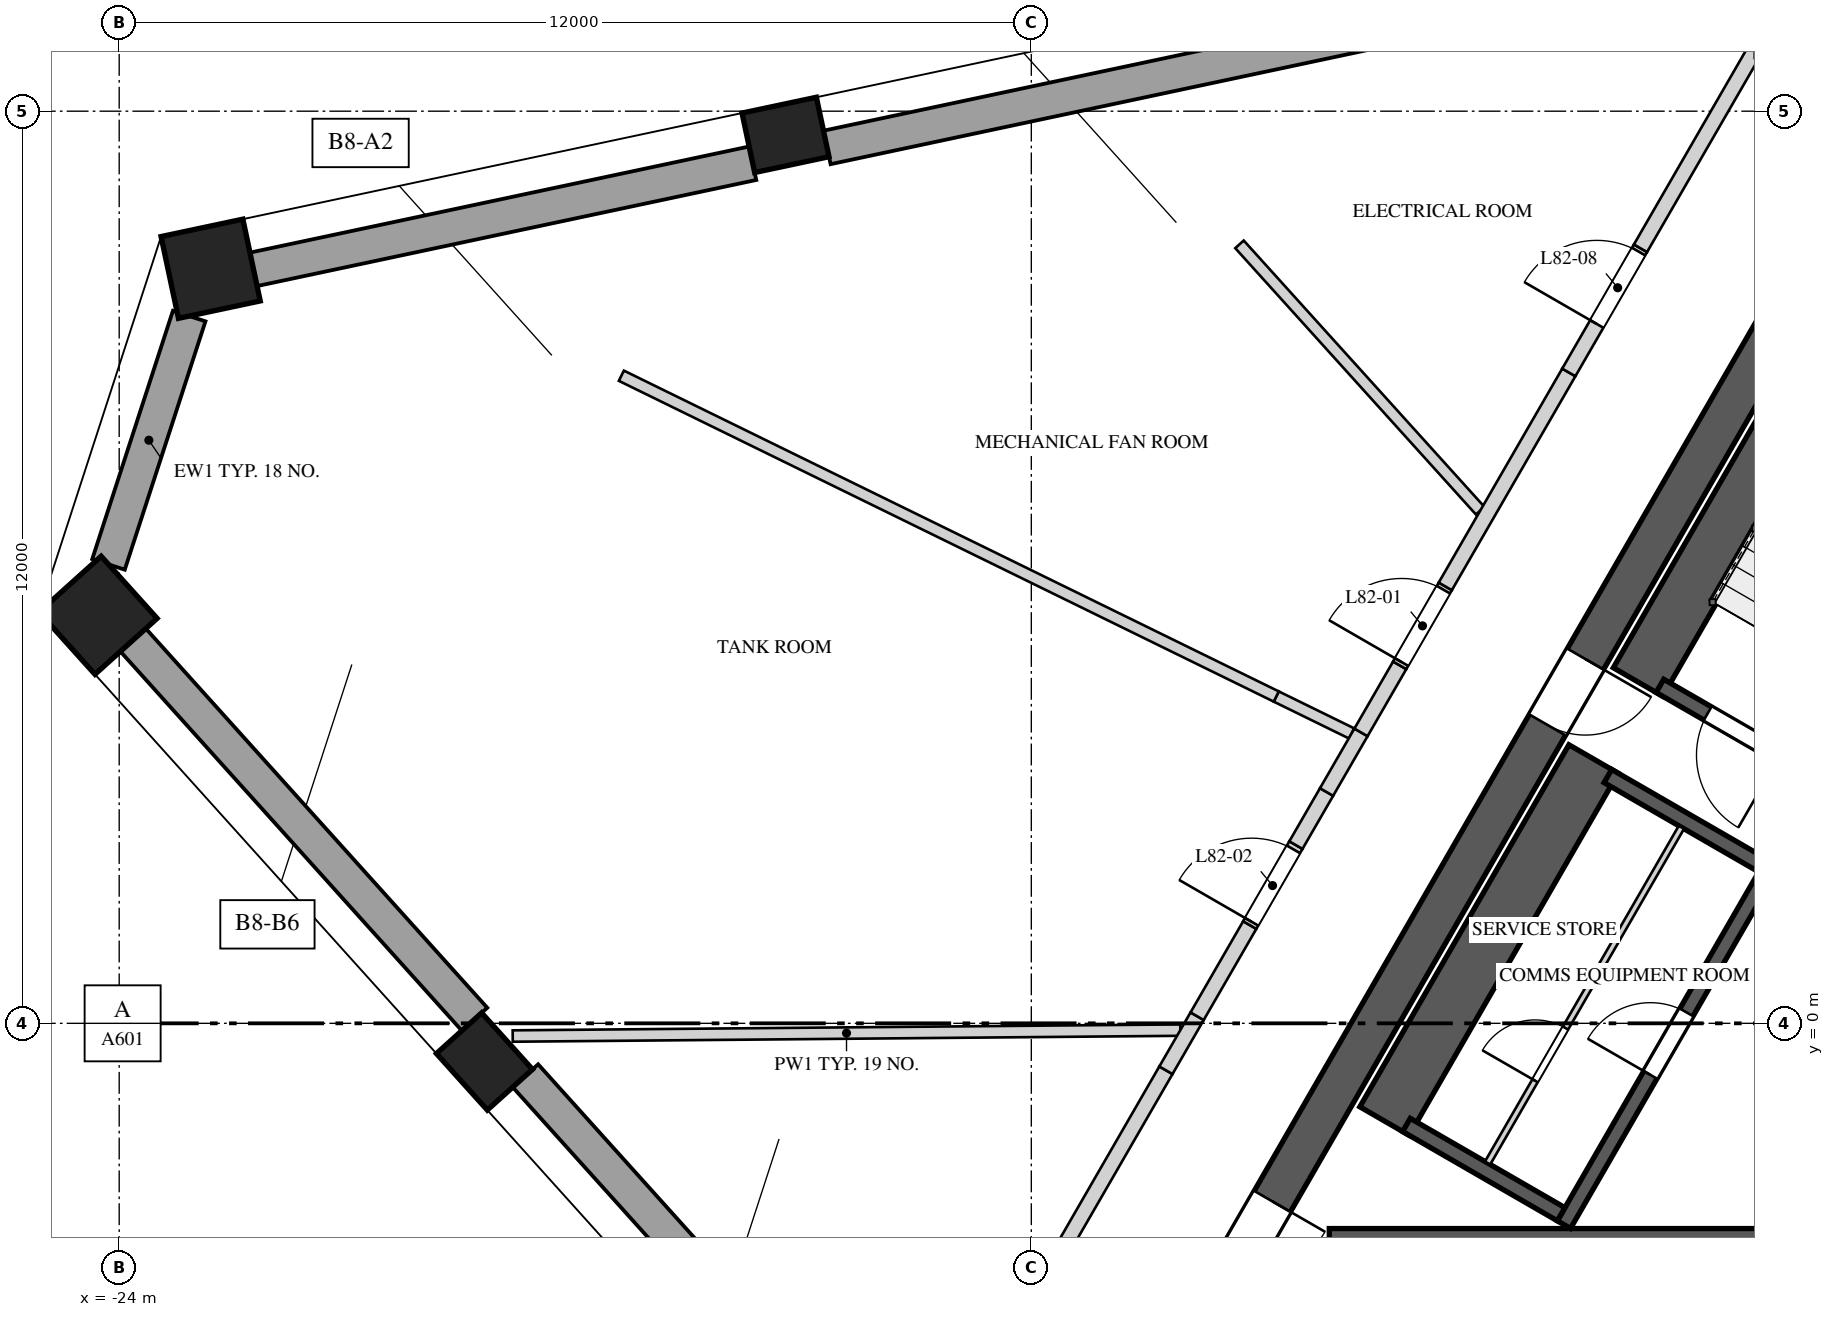
"""IFC4 building model, lengths in metres.
Left out: names, types, materials, properties, quantities, classifications, styles, units other than length and angle.
Written with IfcOpenShell. Run it as: python <this file> out.ifc"""

import sys

from ifc_helpers import new_model, si_unit, direction, frame, frame_2d, origin, origin_2d, place, context, subcontext, project, spatial, polyline, rectangle, outline, extrude, element, fill, save


model = new_model("IFC4")
c1 = context("Model", 3, precision=1e-05, world=origin(), true_north=direction((0.0, 1.0)))
c2 = subcontext(c1, "Body", "Model", "MODEL_VIEW")
j1 = project(units=[si_unit("LENGTHUNIT", "METRE"), si_unit("PLANEANGLEUNIT", "RADIAN")], contexts=[c1])
p1 = place(None, origin())
s1 = spatial("IfcSite", under=j1, at=p1, CompositionType="ELEMENT")
p2 = place(p1, origin())
s2 = spatial("IfcBuilding", under=s1, at=p2, CompositionType="ELEMENT")
p3 = place(p2, frame((0.0, 0.0, 356.9)))
s3 = spatial("IfcBuildingStorey", under=s2, at=p3, CompositionType="ELEMENT", Elevation=356.9)
p4 = place(p3, frame((-1.285, 10.725, 0.0), z_axis=(0.0, 0.0, 1.0), x_axis=(-0.499994590896, -0.86602852671, 0.0)))
e1 = element("IfcWall", 1, at=p4, inside=s3, PredefinedType="SHEAR", context=c2, shape_type="SweptSolid", body=[
    extrude(rectangle(XDim=17.292, YDim=0.55, at=frame_2d((8.646, 0.0))), origin(), (0.0, 0.0, 1.0), 4.5),
])
p5 = place(p4, frame((6.851, 0.0, 0.0)))
e2 = element("IfcOpeningElement", 2, at=p5, cuts=e1, PredefinedType="OPENING", context=c2, shape_type="SweptSolid", body=[
    extrude(rectangle(XDim=1.0, YDim=2.4, at=frame_2d((0.5, 1.2))), frame((0.0, 0.285, 0.0), z_axis=(0.0, -1.0, 0.0), x_axis=(1.0, 0.0, 0.0)), (0.0, 0.0, 1.0), 0.57),
])
p6 = place(p4, frame((15.089, 0.0, 0.0)))
e3 = element("IfcOpeningElement", 3, at=p6, cuts=e1, PredefinedType="OPENING", context=c2, shape_type="SweptSolid", body=[
    extrude(rectangle(XDim=0.8, YDim=2.1, at=frame_2d((0.4, 1.05))), frame((0.0, 0.285, 0.0), z_axis=(0.0, -1.0, 0.0), x_axis=(1.0, 0.0, 0.0)), (0.0, 0.0, 1.0), 0.57),
])
p7 = place(p3, frame((-24.278, 5.368, 0.0), z_axis=(0.0, 0.0, 1.0), x_axis=(0.669130606359, -0.743144825477, 0.0)))
e4 = element("IfcColumn", 4, at=p7, inside=s3, PredefinedType="COLUMN", context=c2, shape_type="SweptSolid", body=[
    extrude(rectangle(XDim=1.1, YDim=1.1, at=origin_2d()), origin(), (0.0, 0.0, 1.0), 4.5),
])
for number, where, z_axis, x_axis in (
    (5, (-19.195, -0.502, 0.0), (0.0, 0.0, 1.0), (0.669, -0.743, 0.0)),
    (6, (-15.234, 11.688, 0.0), (0.0, 0.0, 1.0), (-0.978, -0.208, 0.0)),
):
    element("IfcColumn", number, at=place(p3, frame(where, z_axis=z_axis, x_axis=x_axis)), inside=s3, PredefinedType="COLUMN", context=c2, shape_type="SweptSolid", body=[
        extrude(rectangle(XDim=1.0, YDim=0.8, at=origin_2d()), origin(), (0.0, 0.0, 1.0), 4.5),
    ])
p8 = place(p3, frame((-22.797, 9.927, 0.0), z_axis=(0.0, 0.0, 1.0), x_axis=(-0.978147600734, -0.207911690818, 0.0)))
e7 = element("IfcColumn", 7, at=p8, inside=s3, PredefinedType="COLUMN", context=c2, shape_type="SweptSolid", body=[
    extrude(rectangle(XDim=1.1, YDim=1.1, at=origin_2d()), origin(), (0.0, 0.0, 1.0), 4.5),
])
p9 = place(p3, frame((-23.079, 9.305, 0.0), z_axis=(0.0, 0.0, 1.0), x_axis=(-0.309076430482, -0.95103720228, 0.0)))
e8 = element("IfcWall", 8, at=p9, inside=s3, PredefinedType="SOLIDWALL", context=c2, shape_type="SweptSolid", body=[
    extrude(rectangle(XDim=3.435, YDim=0.45, at=frame_2d((1.718, 0.0))), origin(), (0.0, 0.0, 1.0), 3.8),
])
p10 = place(p3, frame((-23.817, 5.043, 0.0), z_axis=(0.0, 0.0, 1.0), x_axis=(0.669137493687, -0.743138624041, 0.0)))
e9 = element("IfcWall", 9, at=p10, inside=s3, PredefinedType="SOLIDWALL", context=c2, shape_type="SweptSolid", body=[
    extrude(rectangle(XDim=6.714, YDim=0.45, at=frame_2d((3.357, 0.0))), origin(), (0.0, 0.0, 1.0), 3.8),
])
p11 = place(p3, frame((-18.656, -0.689, 0.0), z_axis=(0.0, 0.0, 1.0), x_axis=(0.669117789535, -0.743156365598, 0.0)))
e10 = element("IfcWall", 10, at=p11, inside=s3, PredefinedType="SOLIDWALL", context=c2, shape_type="SweptSolid", body=[
    extrude(rectangle(XDim=7.314, YDim=0.45, at=frame_2d((3.657, 0.0))), origin(), (0.0, 0.0, 1.0), 3.8),
])
p12 = place(p3, frame((-15.666, 11.315, 0.0), z_axis=(0.0, 0.0, 1.0), x_axis=(-0.978144338977, -0.207927035587, 0.0)))
e11 = element("IfcWall", 11, at=p12, inside=s3, PredefinedType="SOLIDWALL", context=c2, shape_type="SweptSolid", body=[
    extrude(rectangle(XDim=6.714, YDim=0.45, at=frame_2d((3.357, 0.0))), origin(), (0.0, 0.0, 1.0), 3.8),
])
p13 = place(p3, frame((-7.533, 13.044, 0.0), z_axis=(0.0, 0.0, 1.0), x_axis=(-0.978151299843, -0.207894287118, 0.0)))
e12 = element("IfcWall", 12, at=p13, inside=s3, PredefinedType="SOLIDWALL", context=c2, shape_type="SweptSolid", body=[
    extrude(rectangle(XDim=7.314, YDim=0.45, at=frame_2d((3.657, 0.0))), origin(), (0.0, 0.0, 1.0), 3.8),
])
p14 = place(p3, frame((-0.918, 9.86, 0.0), z_axis=(0.0, 0.0, 1.0), x_axis=(-0.500026960575, -0.86600983753, 0.0)))
e13 = element("IfcWall", 13, at=p14, inside=s3, PredefinedType="SOLIDWALL", context=c2, shape_type="SweptSolid", body=[
    extrude(rectangle(XDim=6.2, YDim=0.75, at=frame_2d((3.1, 0.0))), origin(), (0.0, 0.0, 1.0), 4.15),
])
p15 = place(p3, frame((-1.521, 3.165, 0.0), z_axis=(0.0, 0.0, 1.0), x_axis=(-0.866030925526, 0.499990435942, 0.0)))
e14 = element("IfcWall", 14, at=p15, inside=s3, PredefinedType="SOLIDWALL", context=c2, shape_type="SweptSolid", body=[
    extrude(rectangle(XDim=2.55, YDim=0.2, at=frame_2d((1.275, 0.0))), origin(), (0.0, 0.0, 1.0), 4.15),
])
p16 = place(p15, frame((0.725, 0.0, 0.0)))
e15 = element("IfcOpeningElement", 15, at=p16, cuts=e14, PredefinedType="OPENING", context=c2, shape_type="SweptSolid", body=[
    extrude(rectangle(XDim=1.1, YDim=2.4, at=frame_2d((0.55, 1.2))), frame((0.0, 0.11, 0.0), z_axis=(0.0, -1.0, 0.0), x_axis=(1.0, 0.0, 0.0)), (0.0, 0.0, 1.0), 0.22),
])
p17 = place(p3, frame((-8.08, -2.8, 0.0), z_axis=(0.0, 0.0, 1.0), x_axis=(1.0, 0.0, 0.0)))
e16 = element("IfcWall", 16, at=p17, inside=s3, PredefinedType="SOLIDWALL", context=c2, shape_type="SweptSolid", body=[
    extrude(rectangle(XDim=6.2, YDim=0.2, at=frame_2d((3.1, 0.0))), origin(), (0.0, 0.0, 1.0), 4.15),
])
p18 = place(p3, frame((-4.993, -2.648, 0.0), z_axis=(0.0, 0.0, 1.0), x_axis=(0.499996545922, 0.866027397988, 0.0)))
e17 = element("IfcWall", 17, at=p18, inside=s3, PredefinedType="SOLIDWALL", context=c2, shape_type="SweptSolid", body=[
    extrude(rectangle(XDim=5.5, YDim=0.2, at=frame_2d((2.75, 0.0))), origin(), (0.0, 0.0, 1.0), 4.15),
])
p19 = place(p18, frame((2.275, 0.0, 0.0)))
e18 = element("IfcOpeningElement", 18, at=p19, cuts=e17, PredefinedType="OPENING", context=c2, shape_type="SweptSolid", body=[
    extrude(rectangle(XDim=0.95, YDim=2.4, at=frame_2d((0.475, 1.2))), frame((0.0, 0.11, 0.0), z_axis=(0.0, -1.0, 0.0), x_axis=(1.0, 0.0, 0.0)), (0.0, 0.0, 1.0), 0.22),
])
p20 = place(p3, frame((-4.603, 3.477, 0.0), z_axis=(0.0, 0.0, 1.0), x_axis=(-0.500015767406, -0.866016300277, 0.0)))
e19 = element("IfcWall", 19, at=p20, inside=s3, PredefinedType="SOLIDWALL", context=c2, shape_type="SweptSolid", body=[
    extrude(rectangle(XDim=5.5, YDim=0.75, at=frame_2d((2.75, 0.0))), origin(), (0.0, 0.0, 1.0), 4.15),
])
p21 = place(p3, frame((-2.38, 2.078, 0.0), z_axis=(0.0, 0.0, 1.0), x_axis=(-0.866061024631, 0.499938297808, 0.0)))
e20 = element("IfcWall", 20, at=p21, inside=s3, PredefinedType="SOLIDWALL", context=c2, shape_type="SweptSolid", body=[
    extrude(rectangle(XDim=2.35, YDim=0.2, at=frame_2d((1.175, 0.0))), origin(), (0.0, 0.0, 1.0), 4.15),
])
p22 = place(p3, frame((-5.03, -2.512, 0.0), z_axis=(0.0, 0.0, 1.0), x_axis=(-0.866016039709, 0.500016218704, 0.0)))
e21 = element("IfcWall", 21, at=p22, inside=s3, PredefinedType="SOLIDWALL", context=c2, shape_type="SweptSolid", body=[
    extrude(rectangle(XDim=2.35, YDim=0.2, at=frame_2d((1.175, 0.0))), origin(), (0.0, 0.0, 1.0), 4.15),
])
p23 = place(p3, frame((-5.997, -1.838, 0.0), z_axis=(0.0, 0.0, 1.0), x_axis=(0.500005610874, 0.86602216432, 0.0)))
e22 = element("IfcWall", 22, at=p23, inside=s3, PredefinedType="PARTITIONING", context=c2, shape_type="SweptSolid", body=[
    extrude(rectangle(XDim=5.1, YDim=0.08, at=frame_2d((2.55, 0.0))), origin(), (0.0, 0.0, 1.0), 4.15),
])
p24 = place(p23, frame((1.25, 0.0, 0.0)))
e23 = element("IfcOpeningElement", 23, at=p24, cuts=e22, PredefinedType="OPENING", context=c2, shape_type="SweptSolid", body=[
    extrude(rectangle(XDim=0.8, YDim=2.1, at=frame_2d((0.4, 1.05))), frame((0.0, 0.05, 0.0), z_axis=(0.0, -1.0, 0.0), x_axis=(1.0, 0.0, 0.0)), (0.0, 0.0, 1.0), 0.1),
])
p25 = place(p3, frame((-10.04, -0.089, 0.0), z_axis=(0.0, 0.0, 1.0), x_axis=(-0.999960441248, -0.00889471414, 0.0)))
e24 = element("IfcWall", 24, at=p25, inside=s3, PredefinedType="PARTITIONING", context=c2, shape_type="SweptSolid", body=[
    extrude(rectangle(XDim=8.783, YDim=0.15, at=frame_2d((4.392, 0.0))), origin(), (0.0, 0.0, 1.0), 3.45),
])
p26 = place(p3, frame((-9.261, 10.248, 0.0), z_axis=(0.0, 0.0, 1.0), x_axis=(0.670485503808, -0.741922630187, 0.0)))
e25 = element("IfcWall", 25, at=p26, inside=s3, PredefinedType="PARTITIONING", context=c2, shape_type="SweptSolid", body=[
    extrude(rectangle(XDim=4.723, YDim=0.15, at=frame_2d((2.362, 0.0))), origin(), (0.0, 0.0, 1.0), 4.15),
])
p27 = place(p3, frame((-7.786, 3.814, 0.0), z_axis=(0.0, 0.0, 1.0), x_axis=(-0.898068056395, 0.439856528976, 0.0)))
e26 = element("IfcWall", 26, at=p27, inside=s3, PredefinedType="PARTITIONING", context=c2, shape_type="SweptSolid", body=[
    extrude(rectangle(XDim=1.104, YDim=0.15, at=frame_2d((0.552, 0.0))), origin(), (0.0, 0.0, 1.0), 3.05),
])
p28 = place(p3, frame((-8.778, 4.3, 0.0), z_axis=(0.0, 0.0, 1.0), x_axis=(-0.898056553391, 0.439880014222, 0.0)))
e27 = element("IfcWall", 27, at=p28, inside=s3, PredefinedType="PARTITIONING", context=c2, shape_type="SweptSolid", body=[
    extrude(rectangle(XDim=9.594, YDim=0.15, at=frame_2d((4.797, 0.0))), origin(), (0.0, 0.0, 1.0), 4.15),
])
p29 = place(p3, frame((-12.326, -4.25, 0.0), z_axis=(0.0, 0.0, 1.0), x_axis=(0.499982771656, 0.866035350345, 0.0)))
e28 = element("IfcWall", 28, at=p29, inside=s3, PredefinedType="SOLIDWALL", context=c2, shape_type="SweptSolid", body=[
    extrude(rectangle(XDim=4.195, YDim=0.2, at=frame_2d((2.097, 0.0))), origin(), (0.0, 0.0, 1.0), 4.15),
])
p30 = place(p3, frame((-10.229, -0.617, 0.0), z_axis=(0.0, 0.0, 1.0), x_axis=(0.5001686003, 0.865928040471, 0.0)))
e29 = element("IfcWall", 29, at=p30, inside=s3, PredefinedType="SOLIDWALL", context=c2, shape_type="SweptSolid", body=[
    extrude(rectangle(XDim=0.821, YDim=0.2, at=frame_2d((0.411, 0.0))), origin(), (0.0, 0.0, 1.0), 3.45),
])
p31 = place(p3, frame((-9.819, 0.094, 0.0), z_axis=(0.0, 0.0, 1.0), x_axis=(0.500007335828, 0.866021168401, 0.0)))
e30 = element("IfcWall", 30, at=p31, inside=s3, PredefinedType="SOLIDWALL", context=c2, shape_type="SweptSolid", body=[
    extrude(rectangle(XDim=1.385, YDim=0.2, at=frame_2d((0.692, 0.0))), origin(), (0.0, 0.0, 1.0), 4.15),
])
p32 = place(p3, frame((-9.126, 1.293, 0.0), z_axis=(0.0, 0.0, 1.0), x_axis=(0.499966081581, 0.866044985707, 0.0)))
e31 = element("IfcWall", 31, at=p32, inside=s3, PredefinedType="SOLIDWALL", context=c2, shape_type="SweptSolid", body=[
    extrude(outline(polyline([(0.0, 0.0), (1.214, 0.0), (1.215, 3.05), (0.271, 3.05), (0.271, 4.15), (0.0, 4.15), (0.0, 0.0)])), frame((0.0, 0.1, 0.0), z_axis=(0.0, -1.0, 0.0), x_axis=(1.0, 0.0, 0.0)), (0.0, 0.0, 1.0), 0.2),
])
p33 = place(p32, frame((0.05, 0.0, 0.0)))
e32 = element("IfcOpeningElement", 32, at=p33, cuts=e31, PredefinedType="OPENING", context=c2, shape_type="SweptSolid", body=[
    extrude(rectangle(XDim=1.1, YDim=2.4, at=frame_2d((0.55, 1.2))), frame((0.0, 0.11, 0.0), z_axis=(0.0, -1.0, 0.0), x_axis=(1.0, 0.0, 0.0)), (0.0, 0.0, 1.0), 0.22),
])
p34 = place(p3, frame((-8.519, 2.344, 0.0), z_axis=(0.0, 0.0, 1.0), x_axis=(0.499914554297, 0.866074730264, 0.0)))
e33 = element("IfcWall", 33, at=p34, inside=s3, PredefinedType="SOLIDWALL", context=c2, shape_type="SweptSolid", body=[
    extrude(rectangle(XDim=0.807, YDim=0.2, at=frame_2d((0.403, 0.0))), origin(), (0.0, 0.0, 1.0), 4.15),
])
p35 = place(p3, frame((-8.116, 3.043, 0.0), z_axis=(0.0, 0.0, 1.0), x_axis=(0.499994660107, 0.866028486751, 0.0)))
e34 = element("IfcWall", 34, at=p35, inside=s3, PredefinedType="SOLIDWALL", context=c2, shape_type="SweptSolid", body=[
    extrude(rectangle(XDim=0.906, YDim=0.2, at=frame_2d((0.453, 0.0))), origin(), (0.0, 0.0, 1.0), 3.05),
])
p36 = place(p3, frame((-7.663, 3.828, 0.0), z_axis=(0.0, 0.0, 1.0), x_axis=(0.500033846865, 0.866005861406, 0.0)))
e35 = element("IfcWall", 35, at=p36, inside=s3, PredefinedType="SOLIDWALL", context=c2, shape_type="SweptSolid", body=[
    extrude(rectangle(XDim=1.018, YDim=0.2, at=frame_2d((0.509, 0.0))), origin(), (0.0, 0.0, 1.0), 4.15),
])
p37 = place(p3, frame((-7.154, 4.709, 0.0), z_axis=(0.0, 0.0, 1.0), x_axis=(0.500033551112, 0.866006032174, 0.0)))
e36 = element("IfcWall", 36, at=p37, inside=s3, PredefinedType="SOLIDWALL", context=c2, shape_type="SweptSolid", body=[
    extrude(outline(polyline([(0.0, 0.0), (1.2, 0.0), (1.2, 4.15), (1.027, 4.15), (1.027, 3.25), (0.22, 3.25), (0.22, 4.15), (0.0, 4.15), (0.0, 0.0)])), frame((0.0, 0.1, 0.0), z_axis=(0.0, -1.0, 0.0), x_axis=(1.0, 0.0, 0.0)), (0.0, 0.0, 1.0), 0.2),
])
p38 = place(p37, frame((0.05, 0.0, 0.0)))
e37 = element("IfcOpeningElement", 37, at=p38, cuts=e36, PredefinedType="OPENING", context=c2, shape_type="SweptSolid", body=[
    extrude(rectangle(XDim=1.1, YDim=2.4, at=frame_2d((0.55, 1.2))), frame((0.0, 0.11, 0.0), z_axis=(0.0, -1.0, 0.0), x_axis=(1.0, 0.0, 0.0)), (0.0, 0.0, 1.0), 0.22),
])
p39 = place(p3, frame((-6.554, 5.749, 0.0), z_axis=(0.0, 0.0, 1.0), x_axis=(0.499984717929, 0.866034226713, 0.0)))
e38 = element("IfcWall", 38, at=p39, inside=s3, PredefinedType="SOLIDWALL", context=c2, shape_type="SweptSolid", body=[
    extrude(rectangle(XDim=3.25, YDim=0.2, at=frame_2d((1.625, 0.0))), origin(), (0.0, 0.0, 1.0), 4.15),
])
p40 = place(p3, frame((-4.929, 8.563, 0.0), z_axis=(0.0, 0.0, 1.0), x_axis=(0.49999508309, 0.866028242545, 0.0)))
e39 = element("IfcWall", 39, at=p40, inside=s3, PredefinedType="SOLIDWALL", context=c2, shape_type="SweptSolid", body=[
    extrude(outline(polyline([(0.0, 0.0), (1.886, 0.0), (1.886, 4.15), (0.826, 4.15), (0.826, 3.45), (0.0, 3.45), (0.0, 0.0)])), frame((0.0, 0.1, 0.0), z_axis=(0.0, -1.0, 0.0), x_axis=(1.0, 0.0, 0.0)), (0.0, 0.0, 1.0), 0.2),
])
p41 = place(p40, frame((0.736, 0.0, 0.0)))
e40 = element("IfcOpeningElement", 40, at=p41, cuts=e39, PredefinedType="OPENING", context=c2, shape_type="SweptSolid", body=[
    extrude(rectangle(XDim=1.1, YDim=2.4, at=frame_2d((0.55, 1.2))), frame((0.0, 0.11, 0.0), z_axis=(0.0, -1.0, 0.0), x_axis=(1.0, 0.0, 0.0)), (0.0, 0.0, 1.0), 0.22),
])
p42 = place(p3, frame((-3.986, 10.197, 0.0), z_axis=(0.0, 0.0, 1.0), x_axis=(0.499982583329, 0.866035459071, 0.0)))
e41 = element("IfcWall", 41, at=p42, inside=s3, PredefinedType="SOLIDWALL", context=c2, shape_type="SweptSolid", body=[
    extrude(rectangle(XDim=3.006, YDim=0.2, at=frame_2d((1.503, 0.0))), origin(), (0.0, 0.0, 1.0), 4.15),
])
p43 = place(p3, frame((-2.483, 12.8, 0.0), z_axis=(0.0, 0.0, 1.0), x_axis=(1.0, 0.0, 0.0)))
e42 = element("IfcWall", 42, at=p43, inside=s3, PredefinedType="SOLIDWALL", context=c2, shape_type="SweptSolid", body=[
    extrude(rectangle(XDim=3.003, YDim=0.2, at=frame_2d((1.501, 0.0))), origin(), (0.0, 0.0, 1.0), 4.15),
])
p44 = place(p16, origin())
e43 = element("IfcDoor", 43, at=p44, inside=s3, OperationType="SINGLE_SWING_RIGHT", PredefinedType="DOOR", context=c2, shape_type="SweptSolid", body=[
    extrude(rectangle(XDim=1.1, YDim=2.4, at=frame_2d((0.55, 1.2))), frame((0.0, 0.025, 0.0), z_axis=(0.0, -1.0, 0.0), x_axis=(1.0, 0.0, 0.0)), (0.0, 0.0, 1.0), 0.05),
])
fill(e15, e43)
p45 = place(p19, origin())
e44 = element("IfcDoor", 44, at=p45, inside=s3, OperationType="SINGLE_SWING_LEFT", PredefinedType="DOOR", context=c2, shape_type="SweptSolid", body=[
    extrude(rectangle(XDim=0.95, YDim=2.4, at=frame_2d((0.475, 1.2))), frame((0.0, 0.025, 0.0), z_axis=(0.0, -1.0, 0.0), x_axis=(1.0, 0.0, 0.0)), (0.0, 0.0, 1.0), 0.05),
])
fill(e18, e44)
p46 = place(p24, origin())
e45 = element("IfcDoor", 45, at=p46, inside=s3, OperationType="SINGLE_SWING_RIGHT", PredefinedType="DOOR", context=c2, shape_type="SweptSolid", body=[
    extrude(rectangle(XDim=0.8, YDim=2.1, at=frame_2d((0.4, 1.05))), frame((0.0, 0.025, 0.0), z_axis=(0.0, -1.0, 0.0), x_axis=(1.0, 0.0, 0.0)), (0.0, 0.0, 1.0), 0.05),
])
fill(e23, e45)
p47 = place(p5, origin())
e46 = element("IfcDoor", 46, at=p47, inside=s3, OperationType="SINGLE_SWING_RIGHT", PredefinedType="DOOR", context=c2, shape_type="SweptSolid", body=[
    extrude(rectangle(XDim=1.0, YDim=2.4, at=frame_2d((0.5, 1.2))), frame((0.0, 0.025, 0.0), z_axis=(0.0, -1.0, 0.0), x_axis=(1.0, 0.0, 0.0)), (0.0, 0.0, 1.0), 0.05),
])
fill(e2, e46)
p48 = place(p6, origin())
e47 = element("IfcDoor", 47, at=p48, inside=s3, OperationType="SINGLE_SWING_LEFT", PredefinedType="DOOR", context=c2, shape_type="SweptSolid", body=[
    extrude(rectangle(XDim=0.8, YDim=2.1, at=frame_2d((0.4, 1.05))), frame((0.0, 0.025, 0.0), z_axis=(0.0, -1.0, 0.0), x_axis=(1.0, 0.0, 0.0)), (0.0, 0.0, 1.0), 0.05),
])
fill(e3, e47)
p49 = place(p38, origin())
e48 = element("IfcDoor", 48, at=p49, inside=s3, OperationType="SINGLE_SWING_LEFT", PredefinedType="DOOR", context=c2, shape_type="SweptSolid", body=[
    extrude(rectangle(XDim=1.1, YDim=2.4, at=frame_2d((0.55, 1.2))), frame((0.0, 0.025, 0.0), z_axis=(0.0, -1.0, 0.0), x_axis=(1.0, 0.0, 0.0)), (0.0, 0.0, 1.0), 0.05),
])
fill(e37, e48)
p50 = place(p33, origin())
e49 = element("IfcDoor", 49, at=p50, inside=s3, OperationType="SINGLE_SWING_RIGHT", PredefinedType="DOOR", context=c2, shape_type="SweptSolid", body=[
    extrude(rectangle(XDim=1.1, YDim=2.4, at=frame_2d((0.55, 1.2))), frame((0.0, 0.025, 0.0), z_axis=(0.0, -1.0, 0.0), x_axis=(1.0, 0.0, 0.0)), (0.0, 0.0, 1.0), 0.05),
])
fill(e32, e49)
p51 = place(p41, origin())
e50 = element("IfcDoor", 50, at=p51, inside=s3, OperationType="SINGLE_SWING_RIGHT", PredefinedType="DOOR", context=c2, shape_type="SweptSolid", body=[
    extrude(rectangle(XDim=1.1, YDim=2.4, at=frame_2d((0.55, 1.2))), frame((0.0, 0.025, 0.0), z_axis=(0.0, -1.0, 0.0), x_axis=(1.0, 0.0, 0.0)), (0.0, 0.0, 1.0), 0.05),
])
fill(e40, e50)
save(model, sys.argv[1])
